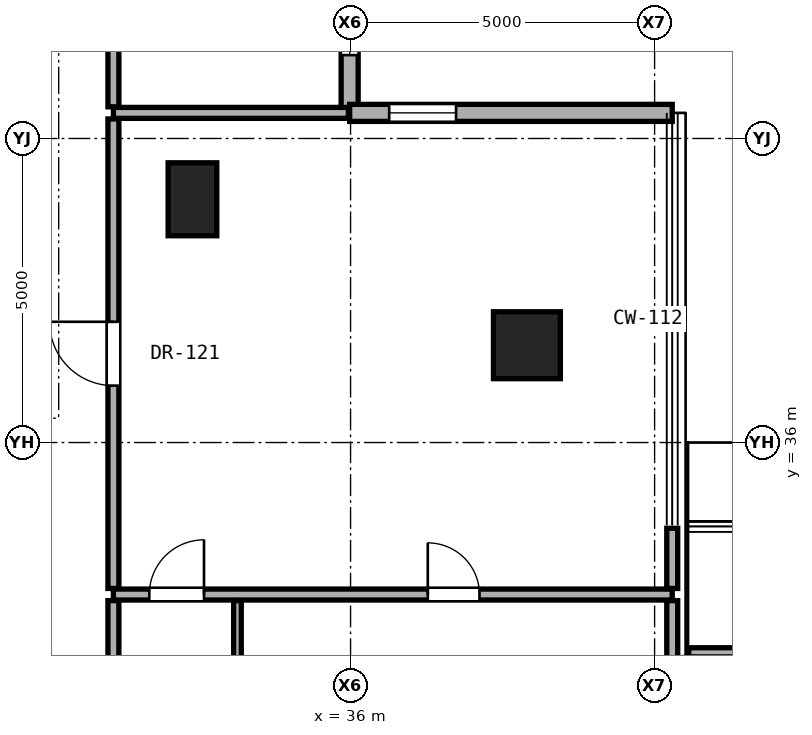
"""IFC4 building model, lengths in metres.
Left out: names, types, materials, properties, quantities, classifications, styles, units other than length and angle.
Written with IfcOpenShell. Run it as: python <this file> out.ifc"""

import sys

from ifc_helpers import new_model, si_unit, direction, frame, frame_2d, origin, origin_2d, place, context, subcontext, project, spatial, rectangle, hollow_rectangle, extrude, element, fill, save


model = new_model("IFC4")
c1 = context("Model", 3, precision=1e-05, world=origin(), true_north=direction((0.0, 1.0)))
c2 = subcontext(c1, "Body", "Model", "MODEL_VIEW")
j1 = project(units=[si_unit("LENGTHUNIT", "METRE"), si_unit("PLANEANGLEUNIT", "RADIAN")], contexts=[c1])
p1 = place(None, origin())
s1 = spatial("IfcSite", under=j1, at=p1, CompositionType="ELEMENT")
p2 = place(p1, origin())
s2 = spatial("IfcBuilding", under=s1, at=p2, CompositionType="ELEMENT")
p3 = place(p2, frame((0.0, 0.0, 95.0)))
s3 = spatial("IfcBuildingStorey", under=s2, at=p3, CompositionType="ELEMENT", Elevation=95.0)
p4 = place(p3, frame((38.9, 37.6, 0.0), z_axis=(0.0, 0.0, 1.0), x_axis=(1.0, 0.0, 0.0)))
e1 = element("IfcColumn", 1, at=p4, inside=s3, PredefinedType="COLUMN", context=c2, shape_type="SweptSolid", body=[
    extrude(hollow_rectangle(XDim=1.1, YDim=1.1, WallThickness=0.06, at=origin_2d()), origin(), (0.0, 0.0, 1.0), 3.3),
])
p5 = place(p3, frame((33.4, 40.0, 0.0), z_axis=(0.0, 0.0, 1.0), x_axis=(1.0, 0.0, 0.0)))
e2 = element("IfcColumn", 2, at=p5, inside=s3, PredefinedType="PILASTER", context=c2, shape_type="SweptSolid", body=[
    extrude(rectangle(XDim=0.8, YDim=1.2, at=origin_2d()), origin(), (0.0, 0.0, 1.0), 3.3),
])
p6 = place(p3, frame((35.985, 41.421, 0.0), z_axis=(0.0, 0.0, 1.0), x_axis=(0.0, 1.0, 0.0)))
e3 = element("IfcWall", 3, at=p6, inside=s3, PredefinedType="SOLIDWALL", context=c2, shape_type="SweptSolid", body=[
    extrude(rectangle(XDim=5.305, YDim=0.28, at=frame_2d((2.653, 0.0))), origin(), (0.0, 0.0, 1.0), 3.06),
])
p7 = place(p6, frame((0.95, 0.0, 0.85)))
e4 = element("IfcOpeningElement", 4, at=p7, cuts=e3, PredefinedType="OPENING", context=c2, shape_type="SweptSolid", body=[
    extrude(rectangle(XDim=1.1, YDim=2.0, at=frame_2d((0.55, 1.0))), frame((0.0, 0.15, 0.0), z_axis=(0.0, -1.0, 0.0), x_axis=(1.0, 0.0, 0.0)), (0.0, 0.0, 1.0), 0.3),
])
p8 = place(p3, frame((41.29, 41.421, 0.0), z_axis=(0.0, 0.0, 1.0), x_axis=(-1.0, 0.0, 0.0)))
e5 = element("IfcWall", 5, at=p8, inside=s3, PredefinedType="SOLIDWALL", context=c2, shape_type="SweptSolid", body=[
    extrude(rectangle(XDim=5.305, YDim=0.28, at=frame_2d((2.652, 0.0))), origin(), (0.0, 0.0, 1.0), 3.06),
])
p9 = place(p8, frame((3.555, 0.0, 0.85)))
e6 = element("IfcOpeningElement", 6, at=p9, cuts=e5, PredefinedType="OPENING", context=c2, shape_type="SweptSolid", body=[
    extrude(rectangle(XDim=1.1, YDim=2.0, at=frame_2d((0.55, 1.0))), frame((0.0, 0.15, 0.0), z_axis=(0.0, -1.0, 0.0), x_axis=(1.0, 0.0, 0.0)), (0.0, 0.0, 1.0), 0.3),
])
p10 = place(p3, frame((41.56, 32.55, 0.0), z_axis=(0.0, 0.0, 1.0), x_axis=(1.0, 0.0, 0.0)))
e7 = element("IfcWall", 7, at=p10, inside=s3, PredefinedType="PARTITIONING", context=c2, shape_type="SweptSolid", body=[
    extrude(rectangle(XDim=5.34, YDim=0.15, at=frame_2d((2.67, 0.0))), origin(), (0.0, 0.0, 1.0), 2.416),
])
p11 = place(p3, frame((32.1, 33.5, 0.0), z_axis=(0.0, 0.0, 1.0), x_axis=(1.0, 0.0, 0.0)))
e8 = element("IfcWall", 8, at=p11, inside=s3, PredefinedType="PARTITIONING", context=c2, shape_type="SweptSolid", body=[
    extrude(rectangle(XDim=9.19, YDim=0.18, at=frame_2d((4.595, 0.0))), origin(), (0.0, 0.0, 1.0), 2.145),
])
p12 = place(p11, frame((5.17, 0.0, 0.0)))
e9 = element("IfcOpeningElement", 9, at=p12, cuts=e8, PredefinedType="OPENING", context=c2, shape_type="SweptSolid", body=[
    extrude(rectangle(XDim=0.85, YDim=2.01, at=frame_2d((0.425, 1.005))), frame((0.0, 0.1, 0.0), z_axis=(0.0, -1.0, 0.0), x_axis=(1.0, 0.0, 0.0)), (0.0, 0.0, 1.0), 0.2),
])
p13 = place(p11, frame((0.59, 0.0, 0.0)))
e10 = element("IfcOpeningElement", 10, at=p13, cuts=e8, PredefinedType="OPENING", context=c2, shape_type="SweptSolid", body=[
    extrude(rectangle(XDim=0.9, YDim=2.1, at=frame_2d((0.45, 1.05))), frame((0.0, 0.1, 0.0), z_axis=(0.0, -1.0, 0.0), x_axis=(1.0, 0.0, 0.0)), (0.0, 0.0, 1.0), 0.2),
])
p14 = place(p3, frame((32.1, 41.421, 0.0), z_axis=(0.0, 0.0, 1.0), x_axis=(1.0, 0.0, 0.0)))
e11 = element("IfcWall", 11, at=p14, inside=s3, PredefinedType="PARTITIONING", context=c2, shape_type="SweptSolid", body=[
    extrude(rectangle(XDim=3.865, YDim=0.18, at=frame_2d((1.933, 0.0))), origin(), (0.0, 0.0, 1.0), 3.08),
])
p15 = place(p3, frame((32.1, 31.272, 0.0), z_axis=(0.0, 0.0, 1.0), x_axis=(0.0, 1.0, 0.0)))
e12 = element("IfcWall", 12, at=p15, inside=s3, PredefinedType="PARTITIONING", context=c2, shape_type="SweptSolid", body=[
    extrude(rectangle(XDim=2.127, YDim=0.18, at=frame_2d((1.064, 0.0))), origin(), (0.0, 0.0, 1.0), 2.299),
])
p16 = place(p3, frame((32.1, 33.6, 0.0), z_axis=(0.0, 0.0, 1.0), x_axis=(0.0, 1.0, 0.0)))
e13 = element("IfcWall", 13, at=p16, inside=s3, PredefinedType="PARTITIONING", context=c2, shape_type="SweptSolid", body=[
    extrude(rectangle(XDim=7.721, YDim=0.18, at=frame_2d((3.86, 0.0))), origin(), (0.0, 0.0, 1.0), 2.456),
])
p17 = place(p16, frame((3.335, 0.0, 0.0)))
e14 = element("IfcOpeningElement", 14, at=p17, cuts=e13, PredefinedType="OPENING", context=c2, shape_type="SweptSolid", body=[
    extrude(rectangle(XDim=1.05, YDim=2.2, at=frame_2d((0.525, 1.1))), frame((0.0, 0.1, 0.0), z_axis=(0.0, -1.0, 0.0), x_axis=(1.0, 0.0, 0.0)), (0.0, 0.0, 1.0), 0.2),
])
p18 = place(p3, frame((32.1, 41.521, 0.0), z_axis=(0.0, 0.0, 1.0), x_axis=(0.0, 1.0, 0.0)))
e15 = element("IfcWall", 15, at=p18, inside=s3, PredefinedType="PARTITIONING", context=c2, shape_type="SweptSolid", body=[
    extrude(rectangle(XDim=5.205, YDim=0.18, at=frame_2d((2.603, 0.0))), origin(), (0.0, 0.0, 1.0), 3.08),
])
p19 = place(p18, frame((2.127, 0.0, 0.0)))
e16 = element("IfcOpeningElement", 16, at=p19, cuts=e15, PredefinedType="OPENING", context=c2, shape_type="SweptSolid", body=[
    extrude(rectangle(XDim=0.95, YDim=2.15, at=frame_2d((0.475, 1.075))), frame((0.0, 0.1, 0.0), z_axis=(0.0, -1.0, 0.0), x_axis=(1.0, 0.0, 0.0)), (0.0, 0.0, 1.0), 0.2),
])
p20 = place(p3, frame((34.14, 31.272, 0.0), z_axis=(0.0, 0.0, 1.0), x_axis=(0.0, 1.0, 0.0)))
e17 = element("IfcWall", 17, at=p20, inside=s3, PredefinedType="PARTITIONING", context=c2, shape_type="SweptSolid", body=[
    extrude(rectangle(XDim=2.127, YDim=0.125, at=frame_2d((1.064, 0.0))), origin(), (0.0, 0.0, 1.0), 2.299),
])
p21 = place(p3, frame((41.29, 31.272, 0.0), z_axis=(0.0, 0.0, 1.0), x_axis=(0.0, 1.0, 0.0)))
e18 = element("IfcWall", 18, at=p21, inside=s3, PredefinedType="PARTITIONING", context=c2, shape_type="SweptSolid", body=[
    extrude(rectangle(XDim=2.127, YDim=0.18, at=frame_2d((1.064, 0.0))), origin(), (0.0, 0.0, 1.0), 2.105),
])
p22 = place(p3, frame((41.29, 33.6, 0.0), z_axis=(0.0, 0.0, 1.0), x_axis=(0.0, 1.0, 0.0)))
e19 = element("IfcWall", 19, at=p22, inside=s3, PredefinedType="PARTITIONING", context=c2, shape_type="SweptSolid", body=[
    extrude(rectangle(XDim=0.99, YDim=0.18, at=frame_2d((0.495, 0.0))), origin(), (0.0, 0.0, 1.0), 2.105),
])
p23 = place(p7, origin())
e20 = element("IfcWindow", 20, at=p23, inside=s3, PartitioningType="SINGLE_PANEL", PredefinedType="WINDOW", context=c2, shape_type="SweptSolid", body=[
    extrude(rectangle(XDim=1.1, YDim=2.0, at=frame_2d((0.55, 1.0))), frame((0.0, 0.03, 0.0), z_axis=(0.0, -1.0, 0.0), x_axis=(1.0, 0.0, 0.0)), (0.0, 0.0, 1.0), 0.06),
])
fill(e4, e20)
p24 = place(p9, origin())
e21 = element("IfcWindow", 21, at=p24, inside=s3, PartitioningType="SINGLE_PANEL", PredefinedType="WINDOW", context=c2, shape_type="SweptSolid", body=[
    extrude(rectangle(XDim=1.1, YDim=2.0, at=frame_2d((0.55, 1.0))), frame((0.0, 0.03, 0.0), z_axis=(0.0, -1.0, 0.0), x_axis=(1.0, 0.0, 0.0)), (0.0, 0.0, 1.0), 0.06),
])
fill(e6, e21)
p25 = place(p17, origin())
e22 = element("IfcDoor", 22, at=p25, inside=s3, OperationType="SINGLE_SWING_RIGHT", PredefinedType="DOOR", context=c2, shape_type="SweptSolid", body=[
    extrude(rectangle(XDim=1.05, YDim=2.2, at=frame_2d((0.525, 1.1))), frame((0.0, 0.025, 0.0), z_axis=(0.0, -1.0, 0.0), x_axis=(1.0, 0.0, 0.0)), (0.0, 0.0, 1.0), 0.05),
])
fill(e14, e22)
p26 = place(p12, origin())
e23 = element("IfcDoor", 23, at=p26, inside=s3, OperationType="SINGLE_SWING_LEFT", PredefinedType="DOOR", context=c2, shape_type="SweptSolid", body=[
    extrude(rectangle(XDim=0.85, YDim=2.01, at=frame_2d((0.425, 1.005))), frame((0.0, 0.025, 0.0), z_axis=(0.0, -1.0, 0.0), x_axis=(1.0, 0.0, 0.0)), (0.0, 0.0, 1.0), 0.05),
])
fill(e9, e23)
p27 = place(p13, origin())
e24 = element("IfcDoor", 24, at=p27, inside=s3, OperationType="SINGLE_SWING_RIGHT", PredefinedType="DOOR", context=c2, shape_type="SweptSolid", body=[
    extrude(rectangle(XDim=0.9, YDim=2.1, at=frame_2d((0.45, 1.05))), frame((0.0, 0.025, 0.0), z_axis=(0.0, -1.0, 0.0), x_axis=(1.0, 0.0, 0.0)), (0.0, 0.0, 1.0), 0.05),
])
fill(e10, e24)
save(model, sys.argv[1])
